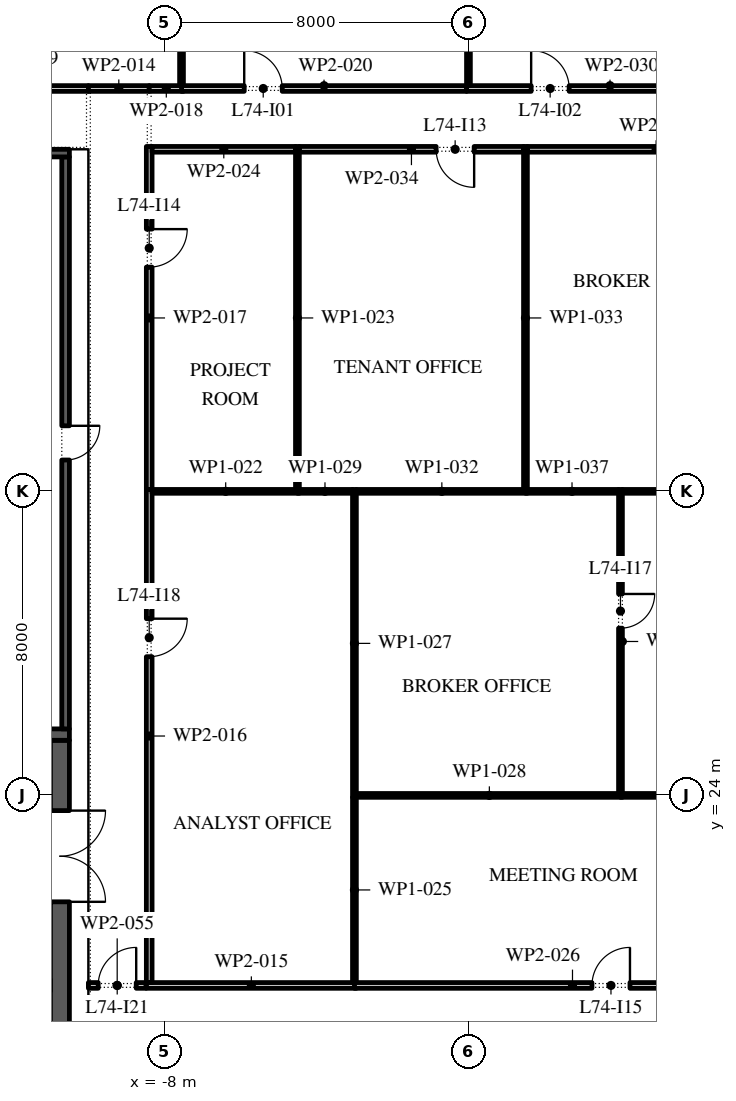
"""IFC4 building model, lengths in metres.
Left out: names, types, materials, properties, quantities, classifications, styles, units other than length and angle.
Written with IfcOpenShell. Run it as: python <this file> out.ifc"""

import sys

from ifc_helpers import new_model, si_unit, direction, frame, frame_2d, origin, place, context, subcontext, project, spatial, rectangle, extrude, element, fill, save


model = new_model("IFC4")
c1 = context("Model", 3, precision=1e-05, world=origin(), true_north=direction((0.0, 1.0)))
c2 = subcontext(c1, "Body", "Model", "MODEL_VIEW")
j1 = project(units=[si_unit("LENGTHUNIT", "METRE"), si_unit("PLANEANGLEUNIT", "RADIAN")], contexts=[c1])
p1 = place(None, origin())
s1 = spatial("IfcSite", under=j1, at=p1, CompositionType="ELEMENT")
p2 = place(p1, origin())
s2 = spatial("IfcBuilding", under=s1, at=p2, CompositionType="ELEMENT")
p3 = place(p2, frame((0.0, 0.0, 338.4)))
s3 = spatial("IfcBuildingStorey", under=s2, at=p3, CompositionType="ELEMENT", Elevation=338.4)
p4 = place(p3, frame((-10.75, -2.45, 0.0), z_axis=(0.0, 0.0, 1.0), x_axis=(0.0, 1.0, 0.0)))
e1 = element("IfcWall", 1, at=p4, inside=s3, PredefinedType="SHEAR", context=c2, shape_type="SweptSolid", body=[
    extrude(rectangle(XDim=27.9, YDim=0.5, at=frame_2d((13.95, 0.0))), origin(), (0.0, 0.0, 1.0), 4.0),
])
p5 = place(p4, frame((23.65, 0.0, 0.0)))
e2 = element("IfcOpeningElement", 2, at=p5, cuts=e1, PredefinedType="OPENING", context=c2, shape_type="SweptSolid", body=[
    extrude(rectangle(XDim=2.4, YDim=2.1, at=frame_2d((1.2, 1.05))), frame((0.0, 0.26, 0.0), z_axis=(0.0, -1.0, 0.0), x_axis=(1.0, 0.0, 0.0)), (0.0, 0.0, 1.0), 0.52),
])
p6 = place(p4, frame((0.788, 0.0, 0.0)))
e3 = element("IfcOpeningElement", 3, at=p6, cuts=e1, PredefinedType="OPENING", context=c2, shape_type="SweptSolid", body=[
    extrude(rectangle(XDim=0.9, YDim=2.1, at=frame_2d((0.45, 1.05))), frame((0.0, 0.26, 0.0), z_axis=(0.0, -1.0, 0.0), x_axis=(1.0, 0.0, 0.0)), (0.0, 0.0, 1.0), 0.52),
])
p7 = place(p4, frame((3.962, 0.0, 0.0)))
e4 = element("IfcOpeningElement", 4, at=p7, cuts=e1, PredefinedType="OPENING", context=c2, shape_type="SweptSolid", body=[
    extrude(rectangle(XDim=1.0, YDim=2.1, at=frame_2d((0.5, 1.05))), frame((0.0, 0.26, 0.0), z_axis=(0.0, -1.0, 0.0), x_axis=(1.0, 0.0, 0.0)), (0.0, 0.0, 1.0), 0.52),
])
p8 = place(p3, frame((-21.5, 25.6, 0.0), z_axis=(0.0, 0.0, 1.0), x_axis=(1.0, 0.0, 0.0)))
e5 = element("IfcWall", 5, at=p8, inside=s3, PredefinedType="SHEAR", context=c2, shape_type="SweptSolid", body=[
    extrude(rectangle(XDim=11.0, YDim=0.3, at=frame_2d((5.5, 0.0))), origin(), (0.0, 0.0, 1.0), 4.0),
])
p9 = place(p3, frame((-10.6, 25.75, 0.0), z_axis=(0.0, 0.0, 1.0), x_axis=(0.0, 1.0, 0.0)))
e6 = element("IfcWall", 6, at=p9, inside=s3, PredefinedType="SHEAR", context=c2, shape_type="SweptSolid", body=[
    extrude(rectangle(XDim=15.05, YDim=0.2, at=frame_2d((7.525, 0.0))), origin(), (0.0, 0.0, 1.0), 4.0),
])
p10 = place(p9, frame((7.075, 0.0, 0.0)))
e7 = element("IfcOpeningElement", 7, at=p10, cuts=e6, PredefinedType="OPENING", context=c2, shape_type="SweptSolid", body=[
    extrude(rectangle(XDim=0.9, YDim=2.1, at=frame_2d((0.45, 1.05))), frame((0.0, 0.11, 0.0), z_axis=(0.0, -1.0, 0.0), x_axis=(1.0, 0.0, 0.0)), (0.0, 0.0, 1.0), 0.22),
])
p11 = place(p3, frame((-21.5, 40.9, 0.0), z_axis=(0.0, 0.0, 1.0), x_axis=(1.0, 0.0, 0.0)))
e8 = element("IfcWall", 8, at=p11, inside=s3, PredefinedType="SHEAR", context=c2, shape_type="SweptSolid", body=[
    extrude(rectangle(XDim=11.0, YDim=0.2, at=frame_2d((5.5, 0.0))), origin(), (0.0, 0.0, 1.0), 4.0),
])
p12 = place(p3, frame((-15.1, 42.6, 0.0), z_axis=(0.0, 0.0, 1.0), x_axis=(1.0, 0.0, 0.0)))
e9 = element("IfcWall", 9, at=p12, inside=s3, PredefinedType="PARTITIONING", context=c2, shape_type="SweptSolid", body=[
    extrude(rectangle(XDim=5.1, YDim=0.15, at=frame_2d((2.55, 0.0))), origin(), (0.0, 0.0, 1.0), 4.0),
])
p13 = place(p12, frame((0.95, 0.0, 0.0)))
e10 = element("IfcOpeningElement", 10, at=p13, cuts=e9, PredefinedType="OPENING", context=c2, shape_type="SweptSolid", body=[
    extrude(rectangle(XDim=1.0, YDim=2.1, at=frame_2d((0.5, 1.05))), frame((0.0, 0.085, 0.0), z_axis=(0.0, -1.0, 0.0), x_axis=(1.0, 0.0, 0.0)), (0.0, 0.0, 1.0), 0.17),
])
p14 = place(p3, frame((-10.0, 42.6, 0.0), z_axis=(0.0, 0.0, 1.0), x_axis=(1.0, 0.0, 0.0)))
e11 = element("IfcWall", 11, at=p14, inside=s3, PredefinedType="PARTITIONING", context=c2, shape_type="SweptSolid", body=[
    extrude(rectangle(XDim=1.6, YDim=0.15, at=frame_2d((0.8, 0.0))), origin(), (0.0, 0.0, 1.0), 4.0),
])
p15 = place(p3, frame((-8.475, 19.0, 0.0), z_axis=(0.0, 0.0, 1.0), x_axis=(1.0, 0.0, 0.0)))
e12 = element("IfcWall", 12, at=p15, inside=s3, PredefinedType="PARTITIONING", context=c2, shape_type="SweptSolid", body=[
    extrude(rectangle(XDim=5.525, YDim=0.15, at=frame_2d((2.763, 0.0))), origin(), (0.0, 0.0, 1.0), 4.0),
])
p16 = place(p3, frame((-8.4, 32.05, 0.0), z_axis=(0.0, 0.0, 1.0), x_axis=(0.0, -1.0, 0.0)))
e13 = element("IfcWall", 13, at=p16, inside=s3, PredefinedType="PARTITIONING", context=c2, shape_type="SweptSolid", body=[
    extrude(rectangle(XDim=12.975, YDim=0.15, at=frame_2d((6.488, 0.0))), origin(), (0.0, 0.0, 1.0), 4.0),
])
p17 = place(p16, frame((3.4, 0.0, 0.0)))
e14 = element("IfcOpeningElement", 14, at=p17, cuts=e13, PredefinedType="OPENING", context=c2, shape_type="SweptSolid", body=[
    extrude(rectangle(XDim=1.0, YDim=2.1, at=frame_2d((0.5, 1.05))), frame((0.0, 0.085, 0.0), z_axis=(0.0, -1.0, 0.0), x_axis=(1.0, 0.0, 0.0)), (0.0, 0.0, 1.0), 0.17),
])
p18 = place(p3, frame((-8.4, 41.075, 0.0), z_axis=(0.0, 0.0, 1.0), x_axis=(0.0, -1.0, 0.0)))
e15 = element("IfcWall", 15, at=p18, inside=s3, PredefinedType="PARTITIONING", context=c2, shape_type="SweptSolid", body=[
    extrude(rectangle(XDim=9.025, YDim=0.15, at=frame_2d((4.512, 0.0))), origin(), (0.0, 0.0, 1.0), 4.0),
])
p19 = place(p18, frame((2.175, 0.0, 0.0)))
e16 = element("IfcOpeningElement", 16, at=p19, cuts=e15, PredefinedType="OPENING", context=c2, shape_type="SweptSolid", body=[
    extrude(rectangle(XDim=1.0, YDim=2.1, at=frame_2d((0.5, 1.05))), frame((0.0, 0.085, 0.0), z_axis=(0.0, -1.0, 0.0), x_axis=(1.0, 0.0, 0.0)), (0.0, 0.0, 1.0), 0.17),
])
p20 = place(p3, frame((-8.4, 42.6, 0.0), z_axis=(0.0, 0.0, 1.0), x_axis=(1.0, 0.0, 0.0)))
e17 = element("IfcWall", 17, at=p20, inside=s3, PredefinedType="PARTITIONING", context=c2, shape_type="SweptSolid", body=[
    extrude(rectangle(XDim=0.9, YDim=0.15, at=frame_2d((0.45, 0.0))), origin(), (0.0, 0.0, 1.0), 4.0),
])
p21 = place(p3, frame((-7.55, 42.675, 0.0), z_axis=(0.0, 0.0, 1.0), x_axis=(0.0, 1.0, 0.0)))
e18 = element("IfcWall", 18, at=p21, inside=s3, PredefinedType="PARTITIONING", context=c2, shape_type="SweptSolid", body=[
    extrude(rectangle(XDim=4.775, YDim=0.1, at=frame_2d((2.387, 0.0))), origin(), (0.0, 0.0, 1.0), 3.164),
])
p22 = place(p3, frame((-7.55, 42.6, 0.0), z_axis=(0.0, 0.0, 1.0), x_axis=(1.0, 0.0, 0.0)))
e19 = element("IfcWall", 19, at=p22, inside=s3, PredefinedType="PARTITIONING", context=c2, shape_type="SweptSolid", body=[
    extrude(rectangle(XDim=7.5, YDim=0.15, at=frame_2d((3.75, 0.0))), origin(), (0.0, 0.0, 1.0), 4.0),
])
p23 = place(p22, frame((1.65, 0.0, 0.0)))
e20 = element("IfcOpeningElement", 20, at=p23, cuts=e19, PredefinedType="OPENING", context=c2, shape_type="SweptSolid", body=[
    extrude(rectangle(XDim=1.0, YDim=2.1, at=frame_2d((0.5, 1.05))), frame((0.0, 0.085, 0.0), z_axis=(0.0, -1.0, 0.0), x_axis=(1.0, 0.0, 0.0)), (0.0, 0.0, 1.0), 0.17),
])
p24 = place(p3, frame((-4.45, 32.0, 0.0), z_axis=(0.0, 0.0, 1.0), x_axis=(-1.0, 0.0, 0.0)))
e21 = element("IfcWall", 21, at=p24, inside=s3, PredefinedType="PARTITIONING", context=c2, shape_type="SweptSolid", body=[
    extrude(rectangle(XDim=3.875, YDim=0.1, at=frame_2d((1.938, 0.0))), origin(), (0.0, 0.0, 1.0), 4.0),
])
p25 = place(p3, frame((-4.5, 32.05, 0.0), z_axis=(0.0, 0.0, 1.0), x_axis=(0.0, 1.0, 0.0)))
e22 = element("IfcWall", 22, at=p25, inside=s3, PredefinedType="PARTITIONING", context=c2, shape_type="SweptSolid", body=[
    extrude(rectangle(XDim=9.025, YDim=0.1, at=frame_2d((4.512, 0.0))), origin(), (0.0, 0.0, 1.0), 4.0),
])
p26 = place(p3, frame((-4.55, 41.0, 0.0), z_axis=(0.0, 0.0, 1.0), x_axis=(-1.0, 0.0, 0.0)))
e23 = element("IfcWall", 23, at=p26, inside=s3, PredefinedType="PARTITIONING", context=c2, shape_type="SweptSolid", body=[
    extrude(rectangle(XDim=3.775, YDim=0.15, at=frame_2d((1.887, 0.0))), origin(), (0.0, 0.0, 1.0), 4.0),
])
p27 = place(p3, frame((-3.0, 19.075, 0.0), z_axis=(0.0, 0.0, 1.0), x_axis=(0.0, 1.0, 0.0)))
e24 = element("IfcWall", 24, at=p27, inside=s3, PredefinedType="PARTITIONING", context=c2, shape_type="SweptSolid", body=[
    extrude(rectangle(XDim=4.875, YDim=0.1, at=frame_2d((2.438, 0.0))), origin(), (0.0, 0.0, 1.0), 4.0),
])
p28 = place(p3, frame((-3.0, 19.0, 0.0), z_axis=(0.0, 0.0, 1.0), x_axis=(1.0, 0.0, 0.0)))
e25 = element("IfcWall", 25, at=p28, inside=s3, PredefinedType="PARTITIONING", context=c2, shape_type="SweptSolid", body=[
    extrude(rectangle(XDim=11.475, YDim=0.15, at=frame_2d((5.738, 0.0))), origin(), (0.0, 0.0, 1.0), 4.0),
])
p29 = place(p28, frame((6.25, 0.0, 0.0)))
e26 = element("IfcOpeningElement", 26, at=p29, cuts=e25, PredefinedType="OPENING", context=c2, shape_type="SweptSolid", body=[
    extrude(rectangle(XDim=1.0, YDim=2.1, at=frame_2d((0.5, 1.05))), frame((0.0, 0.085, 0.0), z_axis=(0.0, -1.0, 0.0), x_axis=(1.0, 0.0, 0.0)), (0.0, 0.0, 1.0), 0.17),
])
p30 = place(p3, frame((-3.0, 23.95, 0.0), z_axis=(0.0, 0.0, 1.0), x_axis=(0.0, 1.0, 0.0)))
e27 = element("IfcWall", 27, at=p30, inside=s3, PredefinedType="PARTITIONING", context=c2, shape_type="SweptSolid", body=[
    extrude(rectangle(XDim=8.1, YDim=0.1, at=frame_2d((4.05, 0.0))), origin(), (0.0, 0.0, 1.0), 4.0),
])
p31 = place(p3, frame((-2.95, 24.0, 0.0), z_axis=(0.0, 0.0, 1.0), x_axis=(1.0, 0.0, 0.0)))
e28 = element("IfcWall", 28, at=p31, inside=s3, PredefinedType="PARTITIONING", context=c2, shape_type="SweptSolid", body=[
    extrude(rectangle(XDim=7.0, YDim=0.1, at=frame_2d((3.5, 0.0))), origin(), (0.0, 0.0, 1.0), 4.0),
])
p32 = place(p3, frame((-3.05, 32.0, 0.0), z_axis=(0.0, 0.0, 1.0), x_axis=(-1.0, 0.0, 0.0)))
e29 = element("IfcWall", 29, at=p32, inside=s3, PredefinedType="PARTITIONING", context=c2, shape_type="SweptSolid", body=[
    extrude(rectangle(XDim=1.45, YDim=0.1, at=frame_2d((0.725, 0.0))), origin(), (0.0, 0.0, 1.0), 4.0),
])
p33 = place(p3, frame((-0.05, 42.6, 0.0), z_axis=(0.0, 0.0, 1.0), x_axis=(1.0, 0.0, 0.0)))
e30 = element("IfcWall", 30, at=p33, inside=s3, PredefinedType="PARTITIONING", context=c2, shape_type="SweptSolid", body=[
    extrude(rectangle(XDim=7.55, YDim=0.15, at=frame_2d((3.775, 0.0))), origin(), (0.0, 0.0, 1.0), 4.0),
])
p34 = place(p33, frame((1.7, 0.0, 0.0)))
e31 = element("IfcOpeningElement", 31, at=p34, cuts=e30, PredefinedType="OPENING", context=c2, shape_type="SweptSolid", body=[
    extrude(rectangle(XDim=1.0, YDim=2.1, at=frame_2d((0.5, 1.05))), frame((0.0, 0.085, 0.0), z_axis=(0.0, -1.0, 0.0), x_axis=(1.0, 0.0, 0.0)), (0.0, 0.0, 1.0), 0.17),
])
p35 = place(p3, frame((0.0, 52.8, 0.0), z_axis=(0.0, 0.0, 1.0), x_axis=(0.0, -1.0, 0.0)))
e32 = element("IfcWall", 32, at=p35, inside=s3, PredefinedType="PARTITIONING", context=c2, shape_type="SweptSolid", body=[
    extrude(rectangle(XDim=10.125, YDim=0.1, at=frame_2d((5.062, 0.0))), origin(), (0.0, 0.0, 1.0), 4.0),
])
p36 = place(p3, frame((1.55, 32.0, 0.0), z_axis=(0.0, 0.0, 1.0), x_axis=(-1.0, 0.0, 0.0)))
e33 = element("IfcWall", 33, at=p36, inside=s3, PredefinedType="PARTITIONING", context=c2, shape_type="SweptSolid", body=[
    extrude(rectangle(XDim=4.5, YDim=0.1, at=frame_2d((2.25, 0.0))), origin(), (0.0, 0.0, 1.0), 4.0),
])
p37 = place(p3, frame((1.5, 32.05, 0.0), z_axis=(0.0, 0.0, 1.0), x_axis=(0.0, 1.0, 0.0)))
e34 = element("IfcWall", 34, at=p37, inside=s3, PredefinedType="PARTITIONING", context=c2, shape_type="SweptSolid", body=[
    extrude(rectangle(XDim=9.025, YDim=0.1, at=frame_2d((4.512, 0.0))), origin(), (0.0, 0.0, 1.0), 4.0),
])
p38 = place(p3, frame((1.45, 41.0, 0.0), z_axis=(0.0, 0.0, 1.0), x_axis=(-1.0, 0.0, 0.0)))
e35 = element("IfcWall", 35, at=p38, inside=s3, PredefinedType="PARTITIONING", context=c2, shape_type="SweptSolid", body=[
    extrude(rectangle(XDim=5.9, YDim=0.15, at=frame_2d((2.95, 0.0))), origin(), (0.0, 0.0, 1.0), 4.0),
])
p39 = place(p38, frame((1.3, 0.0, 0.0)))
e36 = element("IfcOpeningElement", 36, at=p39, cuts=e35, PredefinedType="OPENING", context=c2, shape_type="SweptSolid", body=[
    extrude(rectangle(XDim=1.0, YDim=2.1, at=frame_2d((0.5, 1.05))), frame((0.0, 0.085, 0.0), z_axis=(0.0, -1.0, 0.0), x_axis=(1.0, 0.0, 0.0)), (0.0, 0.0, 1.0), 0.17),
])
p40 = place(p3, frame((4.0, 24.05, 0.0), z_axis=(0.0, 0.0, 1.0), x_axis=(0.0, 1.0, 0.0)))
e37 = element("IfcWall", 37, at=p40, inside=s3, PredefinedType="PARTITIONING", context=c2, shape_type="SweptSolid", body=[
    extrude(rectangle(XDim=8.0, YDim=0.1, at=frame_2d((4.0, 0.0))), origin(), (0.0, 0.0, 1.0), 4.0),
])
p41 = place(p40, frame((4.35, 0.0, 0.0)))
e38 = element("IfcOpeningElement", 38, at=p41, cuts=e37, PredefinedType="OPENING", context=c2, shape_type="SweptSolid", body=[
    extrude(rectangle(XDim=0.9, YDim=2.1, at=frame_2d((0.45, 1.05))), frame((0.0, 0.06, 0.0), z_axis=(0.0, -1.0, 0.0), x_axis=(1.0, 0.0, 0.0)), (0.0, 0.0, 1.0), 0.12),
])
p42 = place(p3, frame((4.0, 24.0, 0.0), z_axis=(0.0, 0.0, 1.0), x_axis=(1.0, 0.0, 0.0)))
e39 = element("IfcWall", 39, at=p42, inside=s3, PredefinedType="PARTITIONING", context=c2, shape_type="SweptSolid", body=[
    extrude(rectangle(XDim=4.475, YDim=0.1, at=frame_2d((2.238, 0.0))), origin(), (0.0, 0.0, 1.0), 4.0),
])
p43 = place(p3, frame((3.95, 32.0, 0.0), z_axis=(0.0, 0.0, 1.0), x_axis=(-1.0, 0.0, 0.0)))
e40 = element("IfcWall", 40, at=p43, inside=s3, PredefinedType="PARTITIONING", context=c2, shape_type="SweptSolid", body=[
    extrude(rectangle(XDim=2.45, YDim=0.1, at=frame_2d((1.225, 0.0))), origin(), (0.0, 0.0, 1.0), 4.0),
])
p44 = place(p3, frame((8.325, 32.0, 0.0), z_axis=(0.0, 0.0, 1.0), x_axis=(-1.0, 0.0, 0.0)))
e41 = element("IfcWall", 41, at=p44, inside=s3, PredefinedType="PARTITIONING", context=c2, shape_type="SweptSolid", body=[
    extrude(rectangle(XDim=4.275, YDim=0.1, at=frame_2d((2.137, 0.0))), origin(), (0.0, 0.0, 1.0), 4.0),
])
p45 = place(p3, frame((8.325, 41.0, 0.0), z_axis=(0.0, 0.0, 1.0), x_axis=(-1.0, 0.0, 0.0)))
e42 = element("IfcWall", 42, at=p45, inside=s3, PredefinedType="PARTITIONING", context=c2, shape_type="SweptSolid", body=[
    extrude(rectangle(XDim=6.775, YDim=0.15, at=frame_2d((3.387, 0.0))), origin(), (0.0, 0.0, 1.0), 4.0),
])
p46 = place(p3, frame((-10.0, 19.0, 0.0), z_axis=(0.0, 0.0, 1.0), x_axis=(1.0, 0.0, 0.0)))
e43 = element("IfcWall", 43, at=p46, inside=s3, PredefinedType="PARTITIONING", context=c2, shape_type="SweptSolid", body=[
    extrude(rectangle(XDim=1.515, YDim=0.15, at=frame_2d((0.757, 0.0))), origin(), (0.0, 0.0, 1.0), 4.0),
])
p47 = place(p46, frame((0.258, 0.0, 0.0)))
e44 = element("IfcOpeningElement", 44, at=p47, cuts=e43, PredefinedType="OPENING", context=c2, shape_type="SweptSolid", body=[
    extrude(rectangle(XDim=1.0, YDim=2.1, at=frame_2d((0.5, 1.05))), frame((0.0, 0.085, 0.0), z_axis=(0.0, -1.0, 0.0), x_axis=(1.0, 0.0, 0.0)), (0.0, 0.0, 1.0), 0.17),
])
p48 = place(p5, frame((2.4, 0.0, 0.0), z_axis=(0.0, 0.0, 1.0), x_axis=(-1.0, 0.0, 0.0)))
e45 = element("IfcDoor", 45, at=p48, inside=s3, OperationType="DOUBLE_DOOR_SINGLE_SWING", PredefinedType="DOOR", context=c2, shape_type="SweptSolid", body=[
    extrude(rectangle(XDim=2.4, YDim=2.1, at=frame_2d((1.2, 1.05))), frame((0.0, 0.025, 0.0), z_axis=(0.0, -1.0, 0.0), x_axis=(1.0, 0.0, 0.0)), (0.0, 0.0, 1.0), 0.05),
])
fill(e2, e45)
p49 = place(p10, frame((0.9, 0.15, 0.0), z_axis=(0.0, 0.0, 1.0), x_axis=(-1.0, 0.0, 0.0)))
e46 = element("IfcDoor", 46, at=p49, inside=s3, OperationType="SINGLE_SWING_RIGHT", PredefinedType="DOOR", context=c2, shape_type="SweptSolid", body=[
    extrude(rectangle(XDim=0.9, YDim=2.1, at=frame_2d((0.45, 1.05))), frame((0.0, 0.1, 0.0), z_axis=(0.0, -1.0, 0.0), x_axis=(1.0, 0.0, 0.0)), (0.0, 0.0, 1.0), 0.05),
])
fill(e7, e46)
p50 = place(p23, origin())
e47 = element("IfcDoor", 47, at=p50, inside=s3, OperationType="SINGLE_SWING_RIGHT", PredefinedType="DOOR", context=c2, shape_type="SweptSolid", body=[
    extrude(rectangle(XDim=1.0, YDim=2.1, at=frame_2d((0.5, 1.05))), frame((0.0, 0.025, 0.0), z_axis=(0.0, -1.0, 0.0), x_axis=(1.0, 0.0, 0.0)), (0.0, 0.0, 1.0), 0.05),
])
fill(e20, e47)
p51 = place(p34, origin())
e48 = element("IfcDoor", 48, at=p51, inside=s3, OperationType="SINGLE_SWING_RIGHT", PredefinedType="DOOR", context=c2, shape_type="SweptSolid", body=[
    extrude(rectangle(XDim=1.0, YDim=2.1, at=frame_2d((0.5, 1.05))), frame((0.0, 0.025, 0.0), z_axis=(0.0, -1.0, 0.0), x_axis=(1.0, 0.0, 0.0)), (0.0, 0.0, 1.0), 0.05),
])
fill(e31, e48)
p52 = place(p39, origin())
e49 = element("IfcDoor", 49, at=p52, inside=s3, OperationType="SINGLE_SWING_RIGHT", PredefinedType="DOOR", context=c2, shape_type="SweptSolid", body=[
    extrude(rectangle(XDim=1.0, YDim=2.1, at=frame_2d((0.5, 1.05))), frame((0.0, 0.025, 0.0), z_axis=(0.0, -1.0, 0.0), x_axis=(1.0, 0.0, 0.0)), (0.0, 0.0, 1.0), 0.05),
])
fill(e36, e49)
p53 = place(p19, origin())
e50 = element("IfcDoor", 50, at=p53, inside=s3, OperationType="SINGLE_SWING_RIGHT", PredefinedType="DOOR", context=c2, shape_type="SweptSolid", body=[
    extrude(rectangle(XDim=1.0, YDim=2.1, at=frame_2d((0.5, 1.05))), frame((0.0, 0.025, 0.0), z_axis=(0.0, -1.0, 0.0), x_axis=(1.0, 0.0, 0.0)), (0.0, 0.0, 1.0), 0.05),
])
fill(e16, e50)
p54 = place(p29, origin())
e51 = element("IfcDoor", 51, at=p54, inside=s3, OperationType="SINGLE_SWING_LEFT", PredefinedType="DOOR", context=c2, shape_type="SweptSolid", body=[
    extrude(rectangle(XDim=1.0, YDim=2.1, at=frame_2d((0.5, 1.05))), frame((0.0, 0.025, 0.0), z_axis=(0.0, -1.0, 0.0), x_axis=(1.0, 0.0, 0.0)), (0.0, 0.0, 1.0), 0.05),
])
fill(e26, e51)
p55 = place(p41, frame((0.9, 0.0, 0.0), z_axis=(0.0, 0.0, 1.0), x_axis=(-1.0, 0.0, 0.0)))
e52 = element("IfcDoor", 52, at=p55, inside=s3, OperationType="SINGLE_SWING_RIGHT", PredefinedType="DOOR", context=c2, shape_type="SweptSolid", body=[
    extrude(rectangle(XDim=0.9, YDim=2.1, at=frame_2d((0.45, 1.05))), frame((0.0, 0.025, 0.0), z_axis=(0.0, -1.0, 0.0), x_axis=(1.0, 0.0, 0.0)), (0.0, 0.0, 1.0), 0.05),
])
fill(e38, e52)
p56 = place(p17, origin())
e53 = element("IfcDoor", 53, at=p56, inside=s3, OperationType="SINGLE_SWING_RIGHT", PredefinedType="DOOR", context=c2, shape_type="SweptSolid", body=[
    extrude(rectangle(XDim=1.0, YDim=2.1, at=frame_2d((0.5, 1.05))), frame((0.0, 0.025, 0.0), z_axis=(0.0, -1.0, 0.0), x_axis=(1.0, 0.0, 0.0)), (0.0, 0.0, 1.0), 0.05),
])
fill(e14, e53)
p57 = place(p47, origin())
e54 = element("IfcDoor", 54, at=p57, inside=s3, OperationType="SINGLE_SWING_LEFT", PredefinedType="DOOR", context=c2, shape_type="SweptSolid", body=[
    extrude(rectangle(XDim=1.0, YDim=2.1, at=frame_2d((0.5, 1.05))), frame((0.0, 0.025, 0.0), z_axis=(0.0, -1.0, 0.0), x_axis=(1.0, 0.0, 0.0)), (0.0, 0.0, 1.0), 0.05),
])
fill(e44, e54)
save(model, sys.argv[1])
